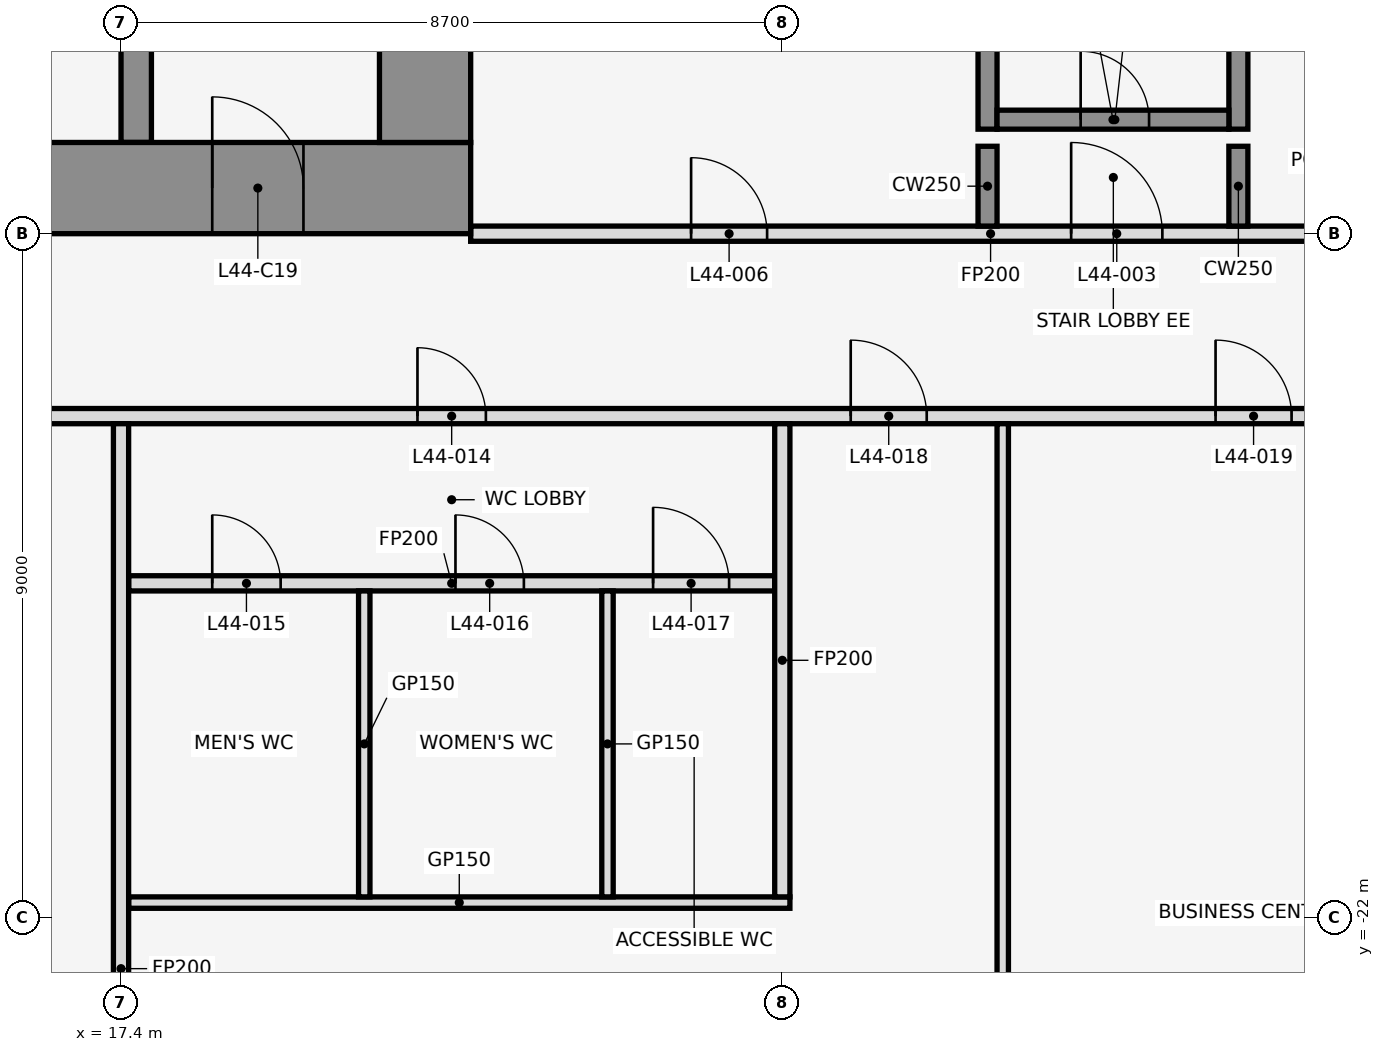
"""IFC4 building model, lengths in metres.
Left out: names, types, materials, properties, quantities, classifications, styles, units other than length and angle.
Written with IfcOpenShell. Run it as: python <this file> out.ifc"""

import sys

from ifc_helpers import new_model, si_unit, direction, frame, frame_2d, origin, place, context, subcontext, project, spatial, rectangle, extrude, element, fill, save


model = new_model("IFC4")
c1 = context("Model", 3, precision=1e-05, world=origin(), true_north=direction((0.0, 1.0)))
c2 = subcontext(c1, "Body", "Model", "MODEL_VIEW")
j1 = project(units=[si_unit("LENGTHUNIT", "METRE"), si_unit("PLANEANGLEUNIT", "RADIAN")], contexts=[c1])
p1 = place(None, origin())
s1 = spatial("IfcSite", under=j1, at=p1, CompositionType="ELEMENT")
p2 = place(p1, origin())
s2 = spatial("IfcBuilding", under=s1, at=p2, CompositionType="ELEMENT")
p3 = place(p2, frame((0.0, 0.0, 199.1)))
s3 = spatial("IfcBuildingStorey", under=s2, at=p3, CompositionType="ELEMENT", Elevation=199.1)
p4 = place(p3, frame((28.8, -11.625, 0.0), z_axis=(0.0, 0.0, 1.0), x_axis=(0.0, 1.0, 0.0)))
e1 = element("IfcWall", 1, at=p4, inside=s3, PredefinedType="SHEAR", context=c2, shape_type="SweptSolid", body=[
    extrude(rectangle(XDim=7.25, YDim=0.25, at=frame_2d((3.625, 0.0))), origin(), (0.0, 0.0, 1.0), 4.1),
])
p5 = place(p3, frame((32.1, -11.625, 0.0), z_axis=(0.0, 0.0, 1.0), x_axis=(0.0, 1.0, 0.0)))
e2 = element("IfcWall", 2, at=p5, inside=s3, PredefinedType="SHEAR", context=c2, shape_type="SweptSolid", body=[
    extrude(rectangle(XDim=7.325, YDim=0.25, at=frame_2d((3.663, 0.0))), origin(), (0.0, 0.0, 1.0), 4.1),
])
p6 = place(p3, frame((28.925, -11.5, 0.0), z_axis=(0.0, 0.0, 1.0), x_axis=(1.0, 0.0, 0.0)))
e3 = element("IfcWall", 3, at=p6, inside=s3, PredefinedType="SHEAR", context=c2, shape_type="SweptSolid", body=[
    extrude(rectangle(XDim=3.05, YDim=0.25, at=frame_2d((1.525, 0.0))), origin(), (0.0, 0.0, 1.0), 4.1),
])
p7 = place(p6, frame((1.1, 0.0, 0.0)))
e4 = element("IfcOpeningElement", 4, at=p7, cuts=e3, PredefinedType="OPENING", context=c2, shape_type="SweptSolid", body=[
    extrude(rectangle(XDim=0.9, YDim=2.1, at=frame_2d((0.45, 1.05))), frame((0.0, 0.137, 0.0), z_axis=(0.0, -1.0, 0.0), x_axis=(1.0, 0.0, 0.0)), (0.0, 0.0, 1.0), 0.274),
])
p8 = place(p3, frame((17.5, -21.8, 0.0), z_axis=(0.0, 0.0, 1.0), x_axis=(1.0, 0.0, 0.0)))
e5 = element("IfcWall", 5, at=p8, inside=s3, PredefinedType="PARTITIONING", context=c2, shape_type="SweptSolid", body=[
    extrude(rectangle(XDim=8.7, YDim=0.15, at=frame_2d((4.35, 0.0))), origin(), (0.0, 0.0, 1.0), 2.84),
])
p9 = place(p3, frame((17.5, -17.6, 0.0), z_axis=(0.0, 0.0, 1.0), x_axis=(1.0, 0.0, 0.0)))
e6 = element("IfcWall", 6, at=p9, inside=s3, PredefinedType="PARTITIONING", context=c2, shape_type="SweptSolid", body=[
    extrude(rectangle(XDim=8.5, YDim=0.2, at=frame_2d((4.25, 0.0))), origin(), (0.0, 0.0, 1.0), 2.84),
])
p10 = place(p9, frame((1.1, 0.0, 0.0)))
e7 = element("IfcOpeningElement", 7, at=p10, cuts=e6, PredefinedType="OPENING", context=c2, shape_type="SweptSolid", body=[
    extrude(rectangle(XDim=0.9, YDim=2.1, at=frame_2d((0.45, 1.05))), frame((0.0, 0.112, 0.0), z_axis=(0.0, -1.0, 0.0), x_axis=(1.0, 0.0, 0.0)), (0.0, 0.0, 1.0), 0.224),
])
p11 = place(p9, frame((4.3, 0.0, 0.0)))
e8 = element("IfcOpeningElement", 8, at=p11, cuts=e6, PredefinedType="OPENING", context=c2, shape_type="SweptSolid", body=[
    extrude(rectangle(XDim=0.9, YDim=2.1, at=frame_2d((0.45, 1.05))), frame((0.0, 0.112, 0.0), z_axis=(0.0, -1.0, 0.0), x_axis=(1.0, 0.0, 0.0)), (0.0, 0.0, 1.0), 0.224),
])
p12 = place(p9, frame((6.9, 0.0, 0.0)))
e9 = element("IfcOpeningElement", 9, at=p12, cuts=e6, PredefinedType="OPENING", context=c2, shape_type="SweptSolid", body=[
    extrude(rectangle(XDim=1.0, YDim=2.1, at=frame_2d((0.5, 1.05))), frame((0.0, 0.112, 0.0), z_axis=(0.0, -1.0, 0.0), x_axis=(1.0, 0.0, 0.0)), (0.0, 0.0, 1.0), 0.224),
])
p13 = place(p3, frame((-35.68, -15.4, 0.0), z_axis=(0.0, 0.0, 1.0), x_axis=(1.0, 0.0, 0.0)))
e10 = element("IfcWall", 10, at=p13, inside=s3, PredefinedType="PARTITIONING", context=c2, shape_type="SweptSolid", body=[
    extrude(rectangle(XDim=71.36, YDim=0.2, at=frame_2d((35.68, 0.0))), origin(), (0.0, 0.0, 1.0), 2.84),
])
p14 = place(p13, frame((5.7, 0.0, 0.0)))
e11 = element("IfcOpeningElement", 11, at=p14, cuts=e10, PredefinedType="OPENING", context=c2, shape_type="SweptSolid", body=[
    extrude(rectangle(XDim=1.0, YDim=2.1, at=frame_2d((0.5, 1.05))), frame((0.0, 0.112, 0.0), z_axis=(0.0, -1.0, 0.0), x_axis=(1.0, 0.0, 0.0)), (0.0, 0.0, 1.0), 0.224),
])
p15 = place(p13, frame((16.28, 0.0, 0.0)))
e12 = element("IfcOpeningElement", 12, at=p15, cuts=e10, PredefinedType="OPENING", context=c2, shape_type="SweptSolid", body=[
    extrude(rectangle(XDim=1.0, YDim=2.1, at=frame_2d((0.5, 1.05))), frame((0.0, 0.112, 0.0), z_axis=(0.0, -1.0, 0.0), x_axis=(1.0, 0.0, 0.0)), (0.0, 0.0, 1.0), 0.224),
])
p16 = place(p13, frame((23.58, 0.0, 0.0)))
e13 = element("IfcOpeningElement", 13, at=p16, cuts=e10, PredefinedType="OPENING", context=c2, shape_type="SweptSolid", body=[
    extrude(rectangle(XDim=1.0, YDim=2.1, at=frame_2d((0.5, 1.05))), frame((0.0, 0.112, 0.0), z_axis=(0.0, -1.0, 0.0), x_axis=(1.0, 0.0, 0.0)), (0.0, 0.0, 1.0), 0.224),
])
p17 = place(p13, frame((30.88, 0.0, 0.0)))
e14 = element("IfcOpeningElement", 14, at=p17, cuts=e10, PredefinedType="OPENING", context=c2, shape_type="SweptSolid", body=[
    extrude(rectangle(XDim=1.0, YDim=2.1, at=frame_2d((0.5, 1.05))), frame((0.0, 0.112, 0.0), z_axis=(0.0, -1.0, 0.0), x_axis=(1.0, 0.0, 0.0)), (0.0, 0.0, 1.0), 0.224),
])
p18 = place(p13, frame((38.08, 0.0, 0.0)))
e15 = element("IfcOpeningElement", 15, at=p18, cuts=e10, PredefinedType="OPENING", context=c2, shape_type="SweptSolid", body=[
    extrude(rectangle(XDim=1.0, YDim=2.1, at=frame_2d((0.5, 1.05))), frame((0.0, 0.112, 0.0), z_axis=(0.0, -1.0, 0.0), x_axis=(1.0, 0.0, 0.0)), (0.0, 0.0, 1.0), 0.224),
])
p19 = place(p13, frame((43.88, 0.0, 0.0)))
e16 = element("IfcOpeningElement", 16, at=p19, cuts=e10, PredefinedType="OPENING", context=c2, shape_type="SweptSolid", body=[
    extrude(rectangle(XDim=1.0, YDim=2.1, at=frame_2d((0.5, 1.05))), frame((0.0, 0.112, 0.0), z_axis=(0.0, -1.0, 0.0), x_axis=(1.0, 0.0, 0.0)), (0.0, 0.0, 1.0), 0.224),
])
p20 = place(p13, frame((49.68, 0.0, 0.0)))
e17 = element("IfcOpeningElement", 17, at=p20, cuts=e10, PredefinedType="OPENING", context=c2, shape_type="SweptSolid", body=[
    extrude(rectangle(XDim=1.0, YDim=2.1, at=frame_2d((0.5, 1.05))), frame((0.0, 0.112, 0.0), z_axis=(0.0, -1.0, 0.0), x_axis=(1.0, 0.0, 0.0)), (0.0, 0.0, 1.0), 0.224),
])
p21 = place(p13, frame((56.98, 0.0, 0.0)))
e18 = element("IfcOpeningElement", 18, at=p21, cuts=e10, PredefinedType="OPENING", context=c2, shape_type="SweptSolid", body=[
    extrude(rectangle(XDim=0.9, YDim=2.1, at=frame_2d((0.45, 1.05))), frame((0.0, 0.112, 0.0), z_axis=(0.0, -1.0, 0.0), x_axis=(1.0, 0.0, 0.0)), (0.0, 0.0, 1.0), 0.224),
])
p22 = place(p13, frame((62.68, 0.0, 0.0)))
e19 = element("IfcOpeningElement", 19, at=p22, cuts=e10, PredefinedType="OPENING", context=c2, shape_type="SweptSolid", body=[
    extrude(rectangle(XDim=1.0, YDim=2.1, at=frame_2d((0.5, 1.05))), frame((0.0, 0.112, 0.0), z_axis=(0.0, -1.0, 0.0), x_axis=(1.0, 0.0, 0.0)), (0.0, 0.0, 1.0), 0.224),
])
p23 = place(p13, frame((67.48, 0.0, 0.0)))
e20 = element("IfcOpeningElement", 20, at=p23, cuts=e10, PredefinedType="OPENING", context=c2, shape_type="SweptSolid", body=[
    extrude(rectangle(XDim=1.0, YDim=2.1, at=frame_2d((0.5, 1.05))), frame((0.0, 0.112, 0.0), z_axis=(0.0, -1.0, 0.0), x_axis=(1.0, 0.0, 0.0)), (0.0, 0.0, 1.0), 0.224),
])
p24 = place(p3, frame((22.0, -13.0, 0.0), z_axis=(0.0, 0.0, 1.0), x_axis=(1.0, 0.0, 0.0)))
e21 = element("IfcWall", 21, at=p24, inside=s3, PredefinedType="PARTITIONING", context=c2, shape_type="SweptSolid", body=[
    extrude(rectangle(XDim=13.68, YDim=0.2, at=frame_2d((6.84, 0.0))), origin(), (0.0, 0.0, 1.0), 2.84),
])
p25 = place(p24, frame((7.9, 0.0, 0.0)))
e22 = element("IfcOpeningElement", 22, at=p25, cuts=e21, PredefinedType="OPENING", context=c2, shape_type="SweptSolid", body=[
    extrude(rectangle(XDim=1.2, YDim=2.1, at=frame_2d((0.6, 1.05))), frame((0.0, 0.112, 0.0), z_axis=(0.0, -1.0, 0.0), x_axis=(1.0, 0.0, 0.0)), (0.0, 0.0, 1.0), 0.224),
])
p26 = place(p24, frame((2.9, 0.0, 0.0)))
e23 = element("IfcOpeningElement", 23, at=p26, cuts=e21, PredefinedType="OPENING", context=c2, shape_type="SweptSolid", body=[
    extrude(rectangle(XDim=1.0, YDim=2.1, at=frame_2d((0.5, 1.05))), frame((0.0, 0.112, 0.0), z_axis=(0.0, -1.0, 0.0), x_axis=(1.0, 0.0, 0.0)), (0.0, 0.0, 1.0), 0.224),
])
p27 = place(p3, frame((17.4, -29.838, 0.0), z_axis=(0.0, 0.0, 1.0), x_axis=(0.0, 1.0, 0.0)))
e24 = element("IfcWall", 24, at=p27, inside=s3, PredefinedType="PARTITIONING", context=c2, shape_type="SweptSolid", body=[
    extrude(rectangle(XDim=14.338, YDim=0.2, at=frame_2d((7.169, 0.0))), origin(), (0.0, 0.0, 1.0), 2.84),
])
for number, where, z_axis, x_axis in (
    (25, (20.6, -21.725, 0.0), (0.0, 0.0, 1.0), (0.0, 1.0, 0.0)),
    (26, (23.8, -21.725, 0.0), (0.0, 0.0, 1.0), (0.0, 1.0, 0.0)),
):
    element("IfcWall", number, at=place(p3, frame(where, z_axis=z_axis, x_axis=x_axis)), inside=s3, PredefinedType="PARTITIONING", context=c2, shape_type="SweptSolid", body=[
        extrude(rectangle(XDim=4.025, YDim=0.15, at=frame_2d((2.013, 0.0))), origin(), (0.0, 0.0, 1.0), 2.84),
    ])
p28 = place(p3, frame((26.1, -21.725, 0.0), z_axis=(0.0, 0.0, 1.0), x_axis=(0.0, 1.0, 0.0)))
e27 = element("IfcWall", 27, at=p28, inside=s3, PredefinedType="PARTITIONING", context=c2, shape_type="SweptSolid", body=[
    extrude(rectangle(XDim=6.225, YDim=0.2, at=frame_2d((3.113, 0.0))), origin(), (0.0, 0.0, 1.0), 2.84),
])
p29 = place(p3, frame((28.8, -12.9, 0.0), z_axis=(0.0, 0.0, 1.0), x_axis=(0.0, 1.0, 0.0)))
e28 = element("IfcWall", 28, at=p29, inside=s3, PredefinedType="SHEAR", context=c2, shape_type="SweptSolid", body=[
    extrude(rectangle(XDim=1.05, YDim=0.25, at=frame_2d((0.525, 0.0))), origin(), (0.0, 0.0, 1.0), 4.1),
])
p30 = place(p3, frame((29.0, -32.52, 0.0), z_axis=(0.0, 0.0, 1.0), x_axis=(0.0, 1.0, 0.0)))
e29 = element("IfcWall", 29, at=p30, inside=s3, PredefinedType="PARTITIONING", context=c2, shape_type="SweptSolid", body=[
    extrude(rectangle(XDim=17.02, YDim=0.15, at=frame_2d((8.51, 0.0))), origin(), (0.0, 0.0, 1.0), 2.84),
])
p31 = place(p3, frame((32.1, -12.9, 0.0), z_axis=(0.0, 0.0, 1.0), x_axis=(0.0, 1.0, 0.0)))
e30 = element("IfcWall", 30, at=p31, inside=s3, PredefinedType="SHEAR", context=c2, shape_type="SweptSolid", body=[
    extrude(rectangle(XDim=1.05, YDim=0.25, at=frame_2d((0.525, 0.0))), origin(), (0.0, 0.0, 1.0), 4.1),
])
p32 = place(p3, frame((17.6, -11.8, 0.0), z_axis=(0.0, 0.0, 1.0), x_axis=(0.0, 1.0, 0.0)))
e31 = element("IfcWall", 31, at=p32, inside=s3, PredefinedType="SHEAR", context=c2, shape_type="SweptSolid", body=[
    extrude(rectangle(XDim=10.6, YDim=0.4, at=frame_2d((5.3, 0.0))), origin(), (0.0, 0.0, 1.0), 4.1),
])
p33 = place(p32, frame((1.25, 0.0, 0.0)))
e32 = element("IfcOpeningElement", 32, at=p33, cuts=e31, PredefinedType="OPENING", context=c2, shape_type="SweptSolid", body=[
    extrude(rectangle(XDim=1.1, YDim=2.1, at=frame_2d((0.55, 1.05))), frame((0.0, 0.212, 0.0), z_axis=(0.0, -1.0, 0.0), x_axis=(1.0, 0.0, 0.0)), (0.0, 0.0, 1.0), 0.424),
])
p34 = place(p32, frame((3.95, 0.0, 0.0)))
e33 = element("IfcOpeningElement", 33, at=p34, cuts=e31, PredefinedType="OPENING", context=c2, shape_type="SweptSolid", body=[
    extrude(rectangle(XDim=1.1, YDim=2.1, at=frame_2d((0.55, 1.05))), frame((0.0, 0.212, 0.0), z_axis=(0.0, -1.0, 0.0), x_axis=(1.0, 0.0, 0.0)), (0.0, 0.0, 1.0), 0.424),
])
p35 = place(p3, frame((-22.0, -12.4, 0.0), z_axis=(0.0, 0.0, 1.0), x_axis=(1.0, 0.0, 0.0)))
e34 = element("IfcWall", 34, at=p35, inside=s3, PredefinedType="SHEAR", context=c2, shape_type="SweptSolid", body=[
    extrude(rectangle(XDim=44.0, YDim=1.2, at=frame_2d((22.0, 0.0))), origin(), (0.0, 0.0, 1.0), 4.1),
])
p36 = place(p35, frame((2.2, 0.0, 0.0)))
e35 = element("IfcOpeningElement", 35, at=p36, cuts=e34, PredefinedType="OPENING", context=c2, shape_type="SweptSolid", body=[
    extrude(rectangle(XDim=1.2, YDim=2.1, at=frame_2d((0.6, 1.05))), frame((0.0, 0.612, 0.0), z_axis=(0.0, -1.0, 0.0), x_axis=(1.0, 0.0, 0.0)), (0.0, 0.0, 1.0), 1.224),
])
p37 = place(p35, frame((21.4, 0.0, 0.0)))
e36 = element("IfcOpeningElement", 36, at=p37, cuts=e34, PredefinedType="OPENING", context=c2, shape_type="SweptSolid", body=[
    extrude(rectangle(XDim=1.2, YDim=2.1, at=frame_2d((0.6, 1.05))), frame((0.0, 0.612, 0.0), z_axis=(0.0, -1.0, 0.0), x_axis=(1.0, 0.0, 0.0)), (0.0, 0.0, 1.0), 1.224),
])
p38 = place(p35, frame((40.6, 0.0, 0.0)))
e37 = element("IfcOpeningElement", 37, at=p38, cuts=e34, PredefinedType="OPENING", context=c2, shape_type="SweptSolid", body=[
    extrude(rectangle(XDim=1.2, YDim=2.1, at=frame_2d((0.6, 1.05))), frame((0.0, 0.612, 0.0), z_axis=(0.0, -1.0, 0.0), x_axis=(1.0, 0.0, 0.0)), (0.0, 0.0, 1.0), 1.224),
])
p39 = place(p35, frame((16.0, 0.0, 0.0)))
e38 = element("IfcOpeningElement", 38, at=p39, cuts=e34, PredefinedType="OPENING", context=c2, shape_type="SweptSolid", body=[
    extrude(rectangle(XDim=1.8, YDim=2.1, at=frame_2d((0.9, 1.05))), frame((0.0, 0.612, 0.0), z_axis=(0.0, -1.0, 0.0), x_axis=(1.0, 0.0, 0.0)), (0.0, 0.0, 1.0), 1.224),
])
p40 = place(p35, frame((6.3, 0.0, 0.0)))
e39 = element("IfcOpeningElement", 39, at=p40, cuts=e34, PredefinedType="OPENING", context=c2, shape_type="SweptSolid", body=[
    extrude(rectangle(XDim=1.2, YDim=2.1, at=frame_2d((0.6, 1.05))), frame((0.0, 0.612, 0.0), z_axis=(0.0, -1.0, 0.0), x_axis=(1.0, 0.0, 0.0)), (0.0, 0.0, 1.0), 1.224),
])
p41 = place(p35, frame((26.2, 0.0, 0.0)))
e40 = element("IfcOpeningElement", 40, at=p41, cuts=e34, PredefinedType="OPENING", context=c2, shape_type="SweptSolid", body=[
    extrude(rectangle(XDim=1.8, YDim=2.1, at=frame_2d((0.9, 1.05))), frame((0.0, 0.612, 0.0), z_axis=(0.0, -1.0, 0.0), x_axis=(1.0, 0.0, 0.0)), (0.0, 0.0, 1.0), 1.224),
])
p42 = place(p35, frame((36.5, 0.0, 0.0)))
e41 = element("IfcOpeningElement", 41, at=p42, cuts=e34, PredefinedType="OPENING", context=c2, shape_type="SweptSolid", body=[
    extrude(rectangle(XDim=1.2, YDim=2.1, at=frame_2d((0.6, 1.05))), frame((0.0, 0.612, 0.0), z_axis=(0.0, -1.0, 0.0), x_axis=(1.0, 0.0, 0.0)), (0.0, 0.0, 1.0), 1.224),
])
p43 = place(p3, frame((21.4, -11.8, 0.0), z_axis=(0.0, 0.0, 1.0), x_axis=(0.0, 1.0, 0.0)))
e42 = element("IfcWall", 42, at=p43, inside=s3, PredefinedType="SHEAR", context=c2, shape_type="SweptSolid", body=[
    extrude(rectangle(XDim=10.6, YDim=1.2, at=frame_2d((5.3, 0.0))), origin(), (0.0, 0.0, 1.0), 4.1),
])
p44 = place(p25, origin())
e43 = element("IfcDoor", 43, at=p44, inside=s3, OperationType="SINGLE_SWING_RIGHT", PredefinedType="DOOR", context=c2, shape_type="SweptSolid", body=[
    extrude(rectangle(XDim=1.2, YDim=2.1, at=frame_2d((0.6, 1.05))), frame((0.0, 0.025, 0.0), z_axis=(0.0, -1.0, 0.0), x_axis=(1.0, 0.0, 0.0)), (0.0, 0.0, 1.0), 0.05),
])
fill(e22, e43)
p45 = place(p7, origin())
e44 = element("IfcDoor", 44, at=p45, inside=s3, OperationType="SINGLE_SWING_LEFT", PredefinedType="DOOR", context=c2, shape_type="SweptSolid", body=[
    extrude(rectangle(XDim=0.9, YDim=2.1, at=frame_2d((0.45, 1.05))), frame((0.0, 0.025, 0.0), z_axis=(0.0, -1.0, 0.0), x_axis=(1.0, 0.0, 0.0)), (0.0, 0.0, 1.0), 0.05),
])
fill(e4, e44)
p46 = place(p26, origin())
e45 = element("IfcDoor", 45, at=p46, inside=s3, OperationType="SINGLE_SWING_RIGHT", PredefinedType="DOOR", context=c2, shape_type="SweptSolid", body=[
    extrude(rectangle(XDim=1.0, YDim=2.1, at=frame_2d((0.5, 1.05))), frame((0.0, 0.025, 0.0), z_axis=(0.0, -1.0, 0.0), x_axis=(1.0, 0.0, 0.0)), (0.0, 0.0, 1.0), 0.05),
])
fill(e23, e45)
p47 = place(p21, frame((0.9, 0.0, 0.0), z_axis=(0.0, 0.0, 1.0), x_axis=(-1.0, 0.0, 0.0)))
e46 = element("IfcDoor", 46, at=p47, inside=s3, OperationType="SINGLE_SWING_RIGHT", PredefinedType="DOOR", context=c2, shape_type="SweptSolid", body=[
    extrude(rectangle(XDim=0.9, YDim=2.1, at=frame_2d((0.45, 1.05))), frame((0.0, 0.025, 0.0), z_axis=(0.0, -1.0, 0.0), x_axis=(1.0, 0.0, 0.0)), (0.0, 0.0, 1.0), 0.05),
])
fill(e18, e46)
p48 = place(p10, frame((0.9, 0.0, 0.0), z_axis=(0.0, 0.0, 1.0), x_axis=(-1.0, 0.0, 0.0)))
e47 = element("IfcDoor", 47, at=p48, inside=s3, OperationType="SINGLE_SWING_RIGHT", PredefinedType="DOOR", context=c2, shape_type="SweptSolid", body=[
    extrude(rectangle(XDim=0.9, YDim=2.1, at=frame_2d((0.45, 1.05))), frame((0.0, 0.025, 0.0), z_axis=(0.0, -1.0, 0.0), x_axis=(1.0, 0.0, 0.0)), (0.0, 0.0, 1.0), 0.05),
])
fill(e7, e47)
p49 = place(p11, frame((0.9, 0.0, 0.0), z_axis=(0.0, 0.0, 1.0), x_axis=(-1.0, 0.0, 0.0)))
e48 = element("IfcDoor", 48, at=p49, inside=s3, OperationType="SINGLE_SWING_LEFT", PredefinedType="DOOR", context=c2, shape_type="SweptSolid", body=[
    extrude(rectangle(XDim=0.9, YDim=2.1, at=frame_2d((0.45, 1.05))), frame((0.0, 0.025, 0.0), z_axis=(0.0, -1.0, 0.0), x_axis=(1.0, 0.0, 0.0)), (0.0, 0.0, 1.0), 0.05),
])
fill(e8, e48)
p50 = place(p12, frame((1.0, 0.0, 0.0), z_axis=(0.0, 0.0, 1.0), x_axis=(-1.0, 0.0, 0.0)))
e49 = element("IfcDoor", 49, at=p50, inside=s3, OperationType="SINGLE_SWING_RIGHT", PredefinedType="DOOR", context=c2, shape_type="SweptSolid", body=[
    extrude(rectangle(XDim=1.0, YDim=2.1, at=frame_2d((0.5, 1.05))), frame((0.0, 0.025, 0.0), z_axis=(0.0, -1.0, 0.0), x_axis=(1.0, 0.0, 0.0)), (0.0, 0.0, 1.0), 0.05),
])
fill(e9, e49)
p51 = place(p22, frame((1.0, 0.0, 0.0), z_axis=(0.0, 0.0, 1.0), x_axis=(-1.0, 0.0, 0.0)))
e50 = element("IfcDoor", 50, at=p51, inside=s3, OperationType="SINGLE_SWING_RIGHT", PredefinedType="DOOR", context=c2, shape_type="SweptSolid", body=[
    extrude(rectangle(XDim=1.0, YDim=2.1, at=frame_2d((0.5, 1.05))), frame((0.0, 0.025, 0.0), z_axis=(0.0, -1.0, 0.0), x_axis=(1.0, 0.0, 0.0)), (0.0, 0.0, 1.0), 0.05),
])
fill(e19, e50)
p52 = place(p23, frame((1.0, 0.0, 0.0), z_axis=(0.0, 0.0, 1.0), x_axis=(-1.0, 0.0, 0.0)))
e51 = element("IfcDoor", 51, at=p52, inside=s3, OperationType="SINGLE_SWING_LEFT", PredefinedType="DOOR", context=c2, shape_type="SweptSolid", body=[
    extrude(rectangle(XDim=1.0, YDim=2.1, at=frame_2d((0.5, 1.05))), frame((0.0, 0.025, 0.0), z_axis=(0.0, -1.0, 0.0), x_axis=(1.0, 0.0, 0.0)), (0.0, 0.0, 1.0), 0.05),
])
fill(e20, e51)
p53 = place(p38, frame((1.2, 0.0, 0.0), z_axis=(0.0, 0.0, 1.0), x_axis=(-1.0, 0.0, 0.0)))
e52 = element("IfcDoor", 52, at=p53, inside=s3, OperationType="SINGLE_SWING_RIGHT", PredefinedType="DOOR", context=c2, shape_type="SweptSolid", body=[
    extrude(rectangle(XDim=1.2, YDim=2.1, at=frame_2d((0.6, 1.05))), frame((0.0, 0.025, 0.0), z_axis=(0.0, -1.0, 0.0), x_axis=(1.0, 0.0, 0.0)), (0.0, 0.0, 1.0), 0.05),
])
fill(e37, e52)
save(model, sys.argv[1])
